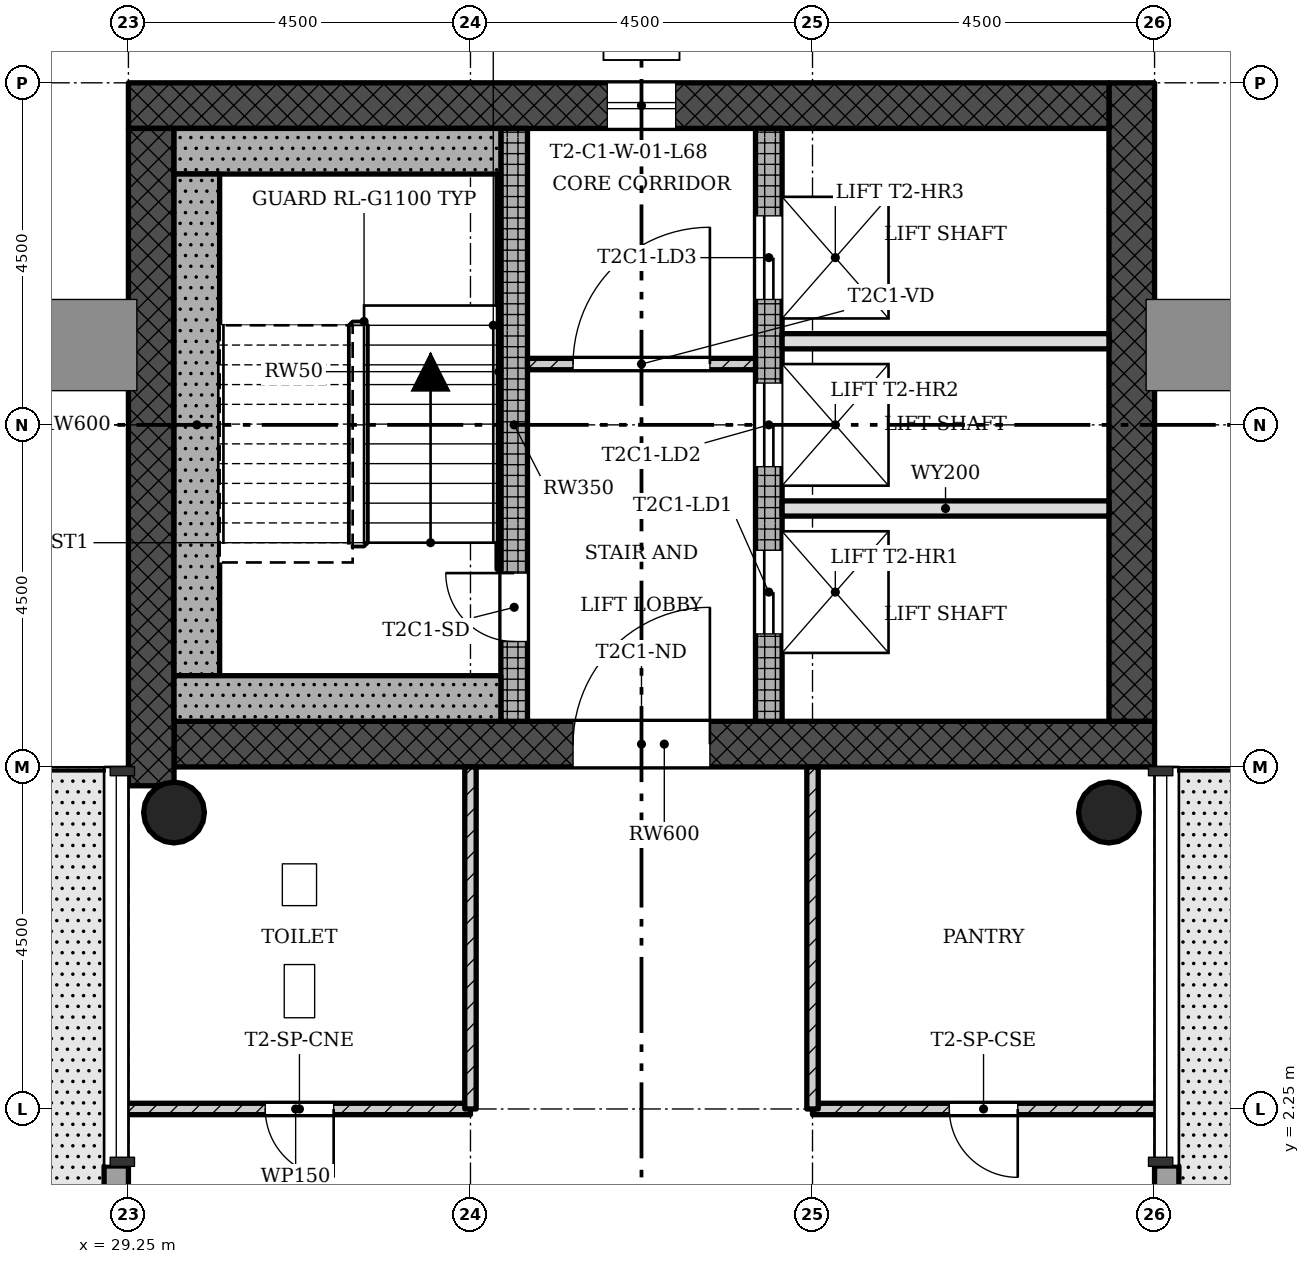
"""IFC4 building model, lengths in metres.
Left out: names, types, materials, properties, quantities, classifications, styles, units other than length and angle.
Written with IfcOpenShell. Run it as: python <this file> out.ifc"""

import sys

from ifc_helpers import new_model, si_unit, direction, frame, frame_2d, origin, origin_2d, place, context, subcontext, project, spatial, rectangle, hollow_circle, extrude, element, fill, save


model = new_model("IFC4")
c1 = context("Model", 3, precision=1e-05, world=origin(), true_north=direction((0.0, 1.0)))
c2 = subcontext(c1, "Body", "Model", "MODEL_VIEW")
j1 = project(units=[si_unit("LENGTHUNIT", "METRE"), si_unit("PLANEANGLEUNIT", "RADIAN")], contexts=[c1])
p1 = place(None, origin())
s1 = spatial("IfcSite", under=j1, at=p1, CompositionType="ELEMENT")
p2 = place(p1, origin())
s2 = spatial("IfcBuilding", under=s1, at=p2, CompositionType="ELEMENT")
p3 = place(p2, frame((0.0, 0.0, 246.9)))
s3 = spatial("IfcBuildingStorey", under=s2, at=p3, CompositionType="ELEMENT", Elevation=246.9)
p4 = place(p3, frame((29.85, 7.05, 0.0), z_axis=(0.0, 0.0, 1.0), x_axis=(1.0, 0.0, 0.0)))
e1 = element("IfcWall", 1, at=p4, inside=s3, PredefinedType="SHEAR", context=c2, shape_type="SweptSolid", body=[
    extrude(rectangle(XDim=12.9, YDim=0.6, at=frame_2d((6.45, 0.0))), origin(), (0.0, 0.0, 1.0), 4.5),
])
p5 = place(p4, frame((5.25, 0.0, 0.0)))
e2 = element("IfcOpeningElement", 2, at=p5, cuts=e1, PredefinedType="OPENING", context=c2, shape_type="SweptSolid", body=[
    extrude(rectangle(XDim=1.8, YDim=2.1, at=frame_2d((0.9, 1.05))), frame((0.0, 0.31, 0.0), z_axis=(0.0, -1.0, 0.0), x_axis=(1.0, 0.0, 0.0)), (0.0, 0.0, 1.0), 0.62),
])
p6 = place(p3, frame((42.45, 7.35, 0.0), z_axis=(0.0, 0.0, 1.0), x_axis=(0.0, 1.0, 0.0)))
e3 = element("IfcWall", 3, at=p6, inside=s3, PredefinedType="SHEAR", context=c2, shape_type="SweptSolid", body=[
    extrude(rectangle(XDim=8.4, YDim=0.6, at=frame_2d((4.2, 0.0))), origin(), (0.0, 0.0, 1.0), 4.5),
])
p7 = place(p3, frame((42.15, 15.45, 0.0), z_axis=(0.0, 0.0, 1.0), x_axis=(-1.0, 0.0, 0.0)))
e4 = element("IfcWall", 4, at=p7, inside=s3, PredefinedType="SHEAR", context=c2, shape_type="SweptSolid", body=[
    extrude(rectangle(XDim=12.9, YDim=0.6, at=frame_2d((6.45, 0.0))), origin(), (0.0, 0.0, 1.0), 4.5),
])
p8 = place(p7, frame((5.7, 0.0, 0.45)))
e5 = element("IfcOpeningElement", 5, at=p8, cuts=e4, PredefinedType="OPENING", context=c2, shape_type="SweptSolid", body=[
    extrude(rectangle(XDim=0.9, YDim=2.4, at=frame_2d((0.45, 1.2))), frame((0.0, 0.31, 0.0), z_axis=(0.0, -1.0, 0.0), x_axis=(1.0, 0.0, 0.0)), (0.0, 0.0, 1.0), 0.62),
])
p9 = place(p3, frame((29.55, 15.15, 0.0), z_axis=(0.0, 0.0, 1.0), x_axis=(0.0, -1.0, 0.0)))
e6 = element("IfcWall", 6, at=p9, inside=s3, PredefinedType="SHEAR", context=c2, shape_type="SweptSolid", body=[
    extrude(rectangle(XDim=8.648, YDim=0.6, at=frame_2d((4.324, 0.0))), origin(), (0.0, 0.0, 1.0), 4.5),
])
p10 = place(p3, frame((34.325, 7.35, 0.0), z_axis=(0.0, 0.0, 1.0), x_axis=(0.0, 1.0, 0.0)))
e7 = element("IfcWall", 7, at=p10, inside=s3, PredefinedType="SHEAR", context=c2, shape_type="SweptSolid", body=[
    extrude(rectangle(XDim=7.8, YDim=0.35, at=frame_2d((3.9, 0.0))), origin(), (0.0, 0.0, 1.0), 4.5),
])
p11 = place(p10, frame((1.05, 0.0, 0.0)))
e8 = element("IfcOpeningElement", 8, at=p11, cuts=e7, PredefinedType="OPENING", context=c2, shape_type="SweptSolid", body=[
    extrude(rectangle(XDim=0.9, YDim=2.1, at=frame_2d((0.45, 1.05))), frame((0.0, 0.185, 0.0), z_axis=(0.0, -1.0, 0.0), x_axis=(1.0, 0.0, 0.0)), (0.0, 0.0, 1.0), 0.37),
])
p12 = place(p3, frame((37.675, 7.35, 0.0), z_axis=(0.0, 0.0, 1.0), x_axis=(0.0, 1.0, 0.0)))
e9 = element("IfcWall", 9, at=p12, inside=s3, PredefinedType="SHEAR", context=c2, shape_type="SweptSolid", body=[
    extrude(rectangle(XDim=7.8, YDim=0.35, at=frame_2d((3.9, 0.0))), origin(), (0.0, 0.0, 1.0), 4.5),
])
p13 = place(p12, frame((1.15, 0.0, 0.0)))
e10 = element("IfcOpeningElement", 10, at=p13, cuts=e9, PredefinedType="OPENING", context=c2, shape_type="SweptSolid", body=[
    extrude(rectangle(XDim=1.1, YDim=2.1, at=frame_2d((0.55, 1.05))), frame((0.0, 0.185, 0.0), z_axis=(0.0, -1.0, 0.0), x_axis=(1.0, 0.0, 0.0)), (0.0, 0.0, 1.0), 0.37),
])
p14 = place(p12, frame((3.35, 0.0, 0.0)))
e11 = element("IfcOpeningElement", 11, at=p14, cuts=e9, PredefinedType="OPENING", context=c2, shape_type="SweptSolid", body=[
    extrude(rectangle(XDim=1.1, YDim=2.1, at=frame_2d((0.55, 1.05))), frame((0.0, 0.185, 0.0), z_axis=(0.0, -1.0, 0.0), x_axis=(1.0, 0.0, 0.0)), (0.0, 0.0, 1.0), 0.37),
])
p15 = place(p12, frame((5.55, 0.0, 0.0)))
e12 = element("IfcOpeningElement", 12, at=p15, cuts=e9, PredefinedType="OPENING", context=c2, shape_type="SweptSolid", body=[
    extrude(rectangle(XDim=1.1, YDim=2.1, at=frame_2d((0.55, 1.05))), frame((0.0, 0.185, 0.0), z_axis=(0.0, -1.0, 0.0), x_axis=(1.0, 0.0, 0.0)), (0.0, 0.0, 1.0), 0.37),
])
for number, where, z_axis, x_axis in (
    (13, (42.15, 6.15, 0.0), (0.0, 0.0, 1.0), (1.0, 0.0, 0.0)),
    (14, (29.85, 6.15, 0.0), (0.0, 0.0, 1.0), (1.0, 0.0, 0.0)),
):
    element("IfcColumn", number, at=place(p3, frame(where, z_axis=z_axis, x_axis=x_axis)), inside=s3, PredefinedType="COLUMN", context=c2, shape_type="SweptSolid", body=[
        extrude(hollow_circle(Radius=0.4, WallThickness=0.028, at=origin_2d()), origin(), (0.0, 0.0, 1.0), 4.5),
    ])
p16 = place(p3, frame((42.91, -1.5, -0.02), z_axis=(0.0, 0.0, 1.0), x_axis=(0.0, 1.0, 0.0)))
e15 = element("IfcWall", 15, at=p16, inside=s3, PredefinedType="STANDARD", context=c2, shape_type="SweptSolid", body=[
    extrude(rectangle(XDim=3.0, YDim=0.32, at=frame_2d((1.5, 0.0))), origin(), (0.0, 0.0, 1.0), 4.22),
])
p17 = place(p16, frame((1.0, 0.0, 0.02)))
e16 = element("IfcOpeningElement", 16, at=p17, cuts=e15, PredefinedType="OPENING", context=c2, shape_type="SweptSolid", body=[
    extrude(rectangle(XDim=1.0, YDim=2.1, at=frame_2d((0.5, 1.05))), frame((0.0, 0.17, 0.0), z_axis=(0.0, -1.0, 0.0), x_axis=(1.0, 0.0, 0.0)), (0.0, 0.0, 1.0), 0.34),
])
p18 = place(p3, frame((29.09, 1.5, -0.02), z_axis=(0.0, 0.0, 1.0), x_axis=(0.0, -1.0, 0.0)))
e17 = element("IfcWall", 17, at=p18, inside=s3, PredefinedType="STANDARD", context=c2, shape_type="SweptSolid", body=[
    extrude(rectangle(XDim=3.0, YDim=0.32, at=frame_2d((1.5, 0.0))), origin(), (0.0, 0.0, 1.0), 4.22),
])
p19 = place(p18, frame((1.0, 0.0, 0.02)))
e18 = element("IfcOpeningElement", 18, at=p19, cuts=e17, PredefinedType="OPENING", context=c2, shape_type="SweptSolid", body=[
    extrude(rectangle(XDim=1.0, YDim=2.1, at=frame_2d((0.5, 1.05))), frame((0.0, 0.17, 0.0), z_axis=(0.0, -1.0, 0.0), x_axis=(1.0, 0.0, 0.0)), (0.0, 0.0, 1.0), 0.34),
])
p20 = place(p3, frame((37.5, 12.05, 0.0), z_axis=(0.0, 0.0, 1.0), x_axis=(-1.0, 0.0, 0.0)))
e19 = element("IfcWall", 19, at=p20, inside=s3, PredefinedType="PARTITIONING", context=c2, shape_type="SweptSolid", body=[
    extrude(rectangle(XDim=3.0, YDim=0.15, at=frame_2d((1.5, 0.0))), origin(), (0.0, 0.0, 1.0), 4.1),
])
p21 = place(p20, frame((0.6, 0.0, 0.0)))
e20 = element("IfcOpeningElement", 20, at=p21, cuts=e19, PredefinedType="OPENING", context=c2, shape_type="SweptSolid", body=[
    extrude(rectangle(XDim=1.8, YDim=2.1, at=frame_2d((0.9, 1.05))), frame((0.0, 0.085, 0.0), z_axis=(0.0, -1.0, 0.0), x_axis=(1.0, 0.0, 0.0)), (0.0, 0.0, 1.0), 0.17),
])
for number, where, z_axis, x_axis in (
    (21, (42.15, 10.15, 0.0), (0.0, 0.0, 1.0), (-1.0, 0.0, 0.0)),
    (22, (42.15, 12.35, 0.0), (0.0, 0.0, 1.0), (-1.0, 0.0, 0.0)),
):
    element("IfcWall", number, at=place(p3, frame(where, z_axis=z_axis, x_axis=x_axis)), inside=s3, PredefinedType="SOLIDWALL", context=c2, shape_type="SweptSolid", body=[
        extrude(rectangle(XDim=4.3, YDim=0.2, at=frame_2d((2.15, 0.0))), origin(), (0.0, 0.0, 1.0), 4.1),
    ])
p22 = place(p3, frame((33.75, 2.25, 0.0), z_axis=(0.0, 0.0, 1.0), x_axis=(-1.0, 0.0, 0.0)))
e23 = element("IfcWall", 23, at=p22, inside=s3, PredefinedType="PARTITIONING", context=c2, shape_type="SweptSolid", body=[
    extrude(rectangle(XDim=4.6, YDim=0.15, at=frame_2d((2.3, 0.0))), origin(), (0.0, 0.0, 1.0), 4.1),
])
p23 = place(p22, frame((1.8, 0.0, 0.0)))
e24 = element("IfcOpeningElement", 24, at=p23, cuts=e23, PredefinedType="OPENING", context=c2, shape_type="SweptSolid", body=[
    extrude(rectangle(XDim=0.9, YDim=2.1, at=frame_2d((0.45, 1.05))), frame((0.0, 0.085, 0.0), z_axis=(0.0, -1.0, 0.0), x_axis=(1.0, 0.0, 0.0)), (0.0, 0.0, 1.0), 0.17),
])
p24 = place(p3, frame((33.75, 2.25, 0.0), z_axis=(0.0, 0.0, 1.0), x_axis=(0.0, 1.0, 0.0)))
e25 = element("IfcWall", 25, at=p24, inside=s3, PredefinedType="PARTITIONING", context=c2, shape_type="SweptSolid", body=[
    extrude(rectangle(XDim=4.5, YDim=0.15, at=frame_2d((2.25, 0.0))), origin(), (0.0, 0.0, 1.0), 4.1),
])
p25 = place(p3, frame((42.85, 2.25, 0.0), z_axis=(0.0, 0.0, 1.0), x_axis=(-1.0, 0.0, 0.0)))
e26 = element("IfcWall", 26, at=p25, inside=s3, PredefinedType="PARTITIONING", context=c2, shape_type="SweptSolid", body=[
    extrude(rectangle(XDim=4.6, YDim=0.15, at=frame_2d((2.3, 0.0))), origin(), (0.0, 0.0, 1.0), 4.1),
])
p26 = place(p25, frame((1.9, 0.0, 0.0)))
e27 = element("IfcOpeningElement", 27, at=p26, cuts=e26, PredefinedType="OPENING", context=c2, shape_type="SweptSolid", body=[
    extrude(rectangle(XDim=0.9, YDim=2.1, at=frame_2d((0.45, 1.05))), frame((0.0, 0.085, 0.0), z_axis=(0.0, -1.0, 0.0), x_axis=(1.0, 0.0, 0.0)), (0.0, 0.0, 1.0), 0.17),
])
p27 = place(p3, frame((38.25, 2.25, 0.0), z_axis=(0.0, 0.0, 1.0), x_axis=(0.0, 1.0, 0.0)))
e28 = element("IfcWall", 28, at=p27, inside=s3, PredefinedType="PARTITIONING", context=c2, shape_type="SweptSolid", body=[
    extrude(rectangle(XDim=4.5, YDim=0.15, at=frame_2d((2.25, 0.0))), origin(), (0.0, 0.0, 1.0), 4.1),
])
p28 = place(p3, frame((34.15, 14.85, 0.0), z_axis=(0.0, 0.0, 1.0), x_axis=(-1.0, 0.0, 0.0)))
e29 = element("IfcWall", 29, at=p28, inside=s3, PredefinedType="SHEAR", context=c2, shape_type="SweptSolid", body=[
    extrude(rectangle(XDim=4.3, YDim=0.6, at=frame_2d((2.15, 0.0))), origin(), (0.0, 0.0, 1.0), 4.5),
])
p29 = place(p3, frame((30.15, 7.95, 0.0), z_axis=(0.0, 0.0, 1.0), x_axis=(0.0, 1.0, 0.0)))
e30 = element("IfcWall", 30, at=p29, inside=s3, PredefinedType="SHEAR", context=c2, shape_type="SweptSolid", body=[
    extrude(rectangle(XDim=6.6, YDim=0.6, at=frame_2d((3.3, 0.0))), origin(), (0.0, 0.0, 1.0), 4.5),
])
p30 = place(p3, frame((34.15, 7.65, 0.0), z_axis=(0.0, 0.0, 1.0), x_axis=(-1.0, 0.0, 0.0)))
e31 = element("IfcWall", 31, at=p30, inside=s3, PredefinedType="SHEAR", context=c2, shape_type="SweptSolid", body=[
    extrude(rectangle(XDim=4.3, YDim=0.6, at=frame_2d((2.15, 0.0))), origin(), (0.0, 0.0, 1.0), 4.5),
])
p31 = place(p3, frame((34.125, 9.35, 0.0), z_axis=(0.0, 0.0, 1.0), x_axis=(0.0, 1.0, 0.0)))
e32 = element("IfcWall", 32, at=p31, inside=s3, PredefinedType="SHEAR", context=c2, shape_type="SweptSolid", body=[
    extrude(rectangle(XDim=5.2, YDim=0.05, at=frame_2d((2.6, 0.0))), origin(), (0.0, 0.0, 1.0), 4.5),
])
p32 = place(p8, origin())
e33 = element("IfcWindow", 33, at=p32, inside=s3, PartitioningType="SINGLE_PANEL", PredefinedType="WINDOW", context=c2, shape_type="SweptSolid", body=[
    extrude(rectangle(XDim=0.9, YDim=2.4, at=frame_2d((0.45, 1.2))), frame((0.0, 0.03, 0.0), z_axis=(0.0, -1.0, 0.0), x_axis=(1.0, 0.0, 0.0)), (0.0, 0.0, 1.0), 0.06),
])
fill(e5, e33)
p33 = place(p21, origin())
e34 = element("IfcDoor", 34, at=p33, inside=s3, OperationType="SINGLE_SWING_LEFT", PredefinedType="DOOR", context=c2, shape_type="SweptSolid", body=[
    extrude(rectangle(XDim=1.8, YDim=2.1, at=frame_2d((0.9, 1.05))), frame((0.0, 0.025, 0.0), z_axis=(0.0, -1.0, 0.0), x_axis=(1.0, 0.0, 0.0)), (0.0, 0.0, 1.0), 0.05),
])
fill(e20, e34)
p34 = place(p23, origin())
e35 = element("IfcDoor", 35, at=p34, inside=s3, OperationType="SINGLE_SWING_RIGHT", PredefinedType="DOOR", context=c2, shape_type="SweptSolid", body=[
    extrude(rectangle(XDim=0.9, YDim=2.1, at=frame_2d((0.45, 1.05))), frame((0.0, 0.025, 0.0), z_axis=(0.0, -1.0, 0.0), x_axis=(1.0, 0.0, 0.0)), (0.0, 0.0, 1.0), 0.05),
])
fill(e24, e35)
p35 = place(p26, origin())
e36 = element("IfcDoor", 36, at=p35, inside=s3, OperationType="SINGLE_SWING_RIGHT", PredefinedType="DOOR", context=c2, shape_type="SweptSolid", body=[
    extrude(rectangle(XDim=0.9, YDim=2.1, at=frame_2d((0.45, 1.05))), frame((0.0, 0.025, 0.0), z_axis=(0.0, -1.0, 0.0), x_axis=(1.0, 0.0, 0.0)), (0.0, 0.0, 1.0), 0.05),
])
fill(e27, e36)
p36 = place(p11, origin())
e37 = element("IfcDoor", 37, at=p36, inside=s3, OperationType="SINGLE_SWING_LEFT", PredefinedType="DOOR", context=c2, shape_type="SweptSolid", body=[
    extrude(rectangle(XDim=0.9, YDim=2.1, at=frame_2d((0.45, 1.05))), frame((0.0, 0.025, 0.0), z_axis=(0.0, -1.0, 0.0), x_axis=(1.0, 0.0, 0.0)), (0.0, 0.0, 1.0), 0.05),
])
fill(e8, e37)
p37 = place(p13, origin())
e38 = element("IfcDoor", 38, at=p37, inside=s3, OperationType="SLIDING_TO_LEFT", PredefinedType="DOOR", context=c2, shape_type="SweptSolid", body=[
    extrude(rectangle(XDim=1.1, YDim=2.1, at=frame_2d((0.55, 1.05))), frame((0.0, 0.025, 0.0), z_axis=(0.0, -1.0, 0.0), x_axis=(1.0, 0.0, 0.0)), (0.0, 0.0, 1.0), 0.05),
])
fill(e10, e38)
p38 = place(p14, origin())
e39 = element("IfcDoor", 39, at=p38, inside=s3, OperationType="SLIDING_TO_LEFT", PredefinedType="DOOR", context=c2, shape_type="SweptSolid", body=[
    extrude(rectangle(XDim=1.1, YDim=2.1, at=frame_2d((0.55, 1.05))), frame((0.0, 0.025, 0.0), z_axis=(0.0, -1.0, 0.0), x_axis=(1.0, 0.0, 0.0)), (0.0, 0.0, 1.0), 0.05),
])
fill(e11, e39)
p39 = place(p15, origin())
e40 = element("IfcDoor", 40, at=p39, inside=s3, OperationType="SLIDING_TO_LEFT", PredefinedType="DOOR", context=c2, shape_type="SweptSolid", body=[
    extrude(rectangle(XDim=1.1, YDim=2.1, at=frame_2d((0.55, 1.05))), frame((0.0, 0.025, 0.0), z_axis=(0.0, -1.0, 0.0), x_axis=(1.0, 0.0, 0.0)), (0.0, 0.0, 1.0), 0.05),
])
fill(e12, e40)
p40 = place(p5, origin())
e41 = element("IfcDoor", 41, at=p40, inside=s3, OperationType="SINGLE_SWING_LEFT", PredefinedType="DOOR", context=c2, shape_type="SweptSolid", body=[
    extrude(rectangle(XDim=1.8, YDim=2.1, at=frame_2d((0.9, 1.05))), frame((0.0, 0.025, 0.0), z_axis=(0.0, -1.0, 0.0), x_axis=(1.0, 0.0, 0.0)), (0.0, 0.0, 1.0), 0.05),
])
fill(e2, e41)
save(model, sys.argv[1])
